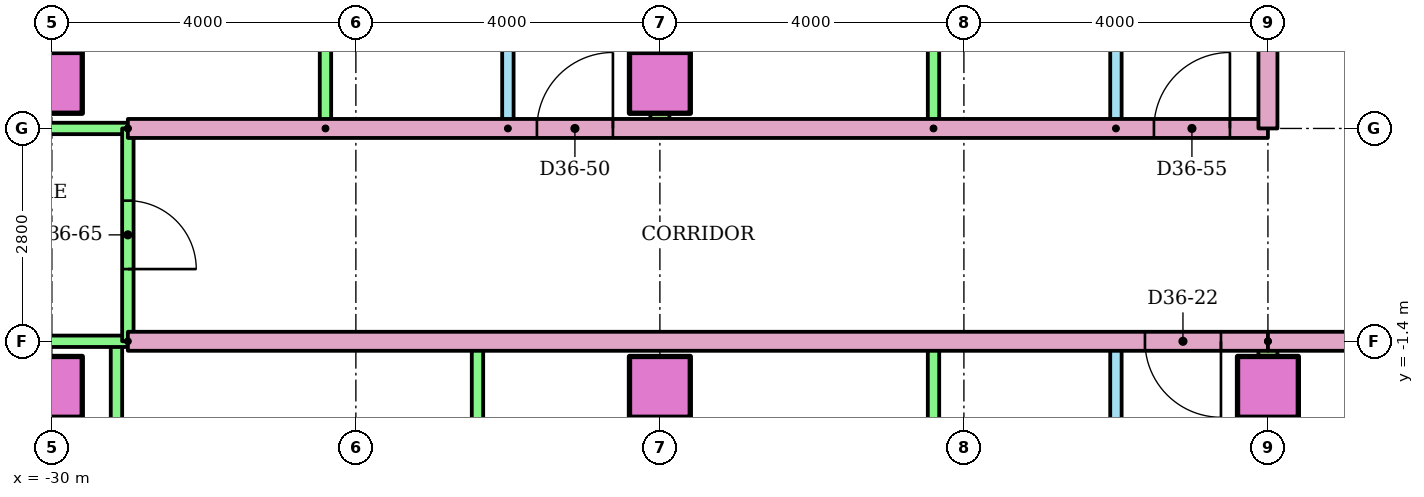
"""IFC4 building model, lengths in metres.
Left out: names, types, materials, properties, quantities, classifications, styles, units other than length and angle.
Written with IfcOpenShell. Run it as: python <this file> out.ifc"""

import sys

from ifc_helpers import new_model, si_unit, direction, frame, frame_2d, origin, origin_2d, place, context, subcontext, project, spatial, rectangle, extrude, element, fill, save


model = new_model("IFC4")
c1 = context("Model", 3, precision=1e-05, world=origin(), true_north=direction((0.0, 1.0)))
c2 = subcontext(c1, "Body", "Model", "MODEL_VIEW")
j1 = project(units=[si_unit("LENGTHUNIT", "METRE"), si_unit("PLANEANGLEUNIT", "RADIAN")], contexts=[c1])
p1 = place(None, origin())
s1 = spatial("IfcSite", under=j1, at=p1, CompositionType="ELEMENT")
p2 = place(p1, origin())
s2 = spatial("IfcBuilding", under=s1, at=p2, CompositionType="ELEMENT")
p3 = place(p2, frame((0.0, 0.0, 139.0)))
s3 = spatial("IfcBuildingStorey", under=s2, at=p3, CompositionType="ELEMENT", Elevation=139.0)
for number, where in (
    (1, (-30.0, -2.0, 0.0)),
    (2, (-22.0, -2.0, 0.0)),
    (3, (-14.0, -2.0, 0.0)),
    (4, (-30.0, 2.0, 0.0)),
    (5, (-22.0, 2.0, 0.0)),
):
    element("IfcColumn", number, at=place(p3, frame(where)), inside=s3, PredefinedType="COLUMN", context=c2, shape_type="SweptSolid", body=[
        extrude(rectangle(XDim=0.8, YDim=0.8, at=origin_2d()), origin(), (0.0, 0.0, 1.0), 3.2),
    ])
p4 = place(p3, frame((-16.0, -6.8, 0.0), z_axis=(0.0, 0.0, 1.0), x_axis=(0.0, 1.0, 0.0)))
e6 = element("IfcWall", 6, at=p4, inside=s3, PredefinedType="PARTITIONING", context=c2, shape_type="SweptSolid", body=[
    extrude(rectangle(XDim=5.4, YDim=0.15, at=frame_2d((2.7, 0.0))), origin(), (0.0, 0.0, 1.0), 2.4),
])
p5 = place(p4, frame((3.45, 0.0, 0.0)))
e7 = element("IfcOpeningElement", 7, at=p5, cuts=e6, PredefinedType="OPENING", context=c2, shape_type="SweptSolid", body=[
    extrude(rectangle(XDim=0.9, YDim=2.1, at=frame_2d((0.45, 1.05))), frame((0.0, 0.085, 0.0), z_axis=(0.0, -1.0, 0.0), x_axis=(1.0, 0.0, 0.0)), (0.0, 0.0, 1.0), 0.17),
])
p6 = place(p4, frame((0.8, 0.0, 0.0)))
e8 = element("IfcOpeningElement", 8, at=p6, cuts=e6, PredefinedType="OPENING", context=c2, shape_type="SweptSolid", body=[
    extrude(rectangle(XDim=0.8, YDim=2.1, at=frame_2d((0.4, 1.05))), frame((0.0, 0.085, 0.0), z_axis=(0.0, -1.0, 0.0), x_axis=(1.0, 0.0, 0.0)), (0.0, 0.0, 1.0), 0.17),
])
for number, where, z_axis, x_axis in (
    (9, (-18.4, -6.8, 0.0), (0.0, 0.0, 1.0), (0.0, 1.0, 0.0)),
    (10, (-24.4, -6.8, 0.0), (0.0, 0.0, 1.0), (0.0, 1.0, 0.0)),
    (11, (-29.15, -6.8, 0.0), (0.0, 0.0, 1.0), (0.0, 1.0, 0.0)),
):
    element("IfcWall", number, at=place(p3, frame(where, z_axis=z_axis, x_axis=x_axis)), inside=s3, PredefinedType="PARTITIONING", context=c2, shape_type="SweptSolid", body=[
        extrude(rectangle(XDim=5.4, YDim=0.15, at=frame_2d((2.7, 0.0))), origin(), (0.0, 0.0, 1.0), 2.4),
    ])
p7 = place(p3, frame((-14.0, -1.4, 0.0), z_axis=(0.0, 0.0, 1.0), x_axis=(0.0, -1.0, 0.0)))
e12 = element("IfcWall", 12, at=p7, inside=s3, PredefinedType="PARTITIONING", context=c2, shape_type="SweptSolid", body=[
    extrude(rectangle(XDim=14.91, YDim=0.25, at=frame_2d((7.455, 0.0))), origin(), (0.0, 0.0, 1.0), 2.4),
])
p8 = place(p3, frame((-14.0, -1.4, 0.0), z_axis=(0.0, 0.0, 1.0), x_axis=(-1.0, 0.0, 0.0)))
e13 = element("IfcWall", 13, at=p8, inside=s3, PredefinedType="PARTITIONING", context=c2, shape_type="SweptSolid", body=[
    extrude(rectangle(XDim=15.0, YDim=0.25, at=frame_2d((7.5, 0.0))), origin(), (0.0, 0.0, 1.0), 2.4),
])
p9 = place(p8, frame((0.618, 0.0, 0.0)))
e14 = element("IfcOpeningElement", 14, at=p9, cuts=e13, PredefinedType="OPENING", context=c2, shape_type="SweptSolid", body=[
    extrude(rectangle(XDim=1.0, YDim=2.1, at=frame_2d((0.5, 1.05))), frame((0.0, 0.135, 0.0), z_axis=(0.0, -1.0, 0.0), x_axis=(1.0, 0.0, 0.0)), (0.0, 0.0, 1.0), 0.27),
])
p10 = place(p3, frame((-29.0, -1.4, 0.0), z_axis=(0.0, 0.0, 1.0), x_axis=(-1.0, 0.0, 0.0)))
e15 = element("IfcWall", 15, at=p10, inside=s3, PredefinedType="PARTITIONING", context=c2, shape_type="SweptSolid", body=[
    extrude(rectangle(XDim=3.72, YDim=0.15, at=frame_2d((1.86, 0.0))), origin(), (0.0, 0.0, 1.0), 2.4),
])
p11 = place(p3, frame((-24.0, 1.4, 0.0), z_axis=(0.0, 0.0, 1.0), x_axis=(0.0, 1.0, 0.0)))
e16 = element("IfcWall", 16, at=p11, inside=s3, PredefinedType="PARTITIONING", context=c2, shape_type="SweptSolid", body=[
    extrude(rectangle(XDim=7.8, YDim=0.15, at=frame_2d((3.9, 0.0))), origin(), (0.0, 0.0, 1.0), 2.4),
])
p12 = place(p11, frame((1.675, 0.0, 0.0)))
e17 = element("IfcOpeningElement", 17, at=p12, cuts=e16, PredefinedType="OPENING", context=c2, shape_type="SweptSolid", body=[
    extrude(rectangle(XDim=0.9, YDim=2.1, at=frame_2d((0.45, 1.05))), frame((0.0, 0.085, 0.0), z_axis=(0.0, -1.0, 0.0), x_axis=(1.0, 0.0, 0.0)), (0.0, 0.0, 1.0), 0.17),
])
p13 = place(p11, frame((5.625, 0.0, 0.0)))
e18 = element("IfcOpeningElement", 18, at=p13, cuts=e16, PredefinedType="OPENING", context=c2, shape_type="SweptSolid", body=[
    extrude(rectangle(XDim=0.8, YDim=2.1, at=frame_2d((0.4, 1.05))), frame((0.0, 0.085, 0.0), z_axis=(0.0, -1.0, 0.0), x_axis=(1.0, 0.0, 0.0)), (0.0, 0.0, 1.0), 0.17),
])
p14 = place(p3, frame((-26.4, 1.4, 0.0), z_axis=(0.0, 0.0, 1.0), x_axis=(0.0, 1.0, 0.0)))
e19 = element("IfcWall", 19, at=p14, inside=s3, PredefinedType="PARTITIONING", context=c2, shape_type="SweptSolid", body=[
    extrude(rectangle(XDim=7.8, YDim=0.15, at=frame_2d((3.9, 0.0))), origin(), (0.0, 0.0, 1.0), 2.4),
])
p15 = place(p3, frame((-16.0, 1.4, 0.0), z_axis=(0.0, 0.0, 1.0), x_axis=(0.0, 1.0, 0.0)))
e20 = element("IfcWall", 20, at=p15, inside=s3, PredefinedType="PARTITIONING", context=c2, shape_type="SweptSolid", body=[
    extrude(rectangle(XDim=7.8, YDim=0.15, at=frame_2d((3.9, 0.0))), origin(), (0.0, 0.0, 1.0), 2.4),
])
p16 = place(p15, frame((1.675, 0.0, 0.0)))
e21 = element("IfcOpeningElement", 21, at=p16, cuts=e20, PredefinedType="OPENING", context=c2, shape_type="SweptSolid", body=[
    extrude(rectangle(XDim=0.9, YDim=2.1, at=frame_2d((0.45, 1.05))), frame((0.0, 0.085, 0.0), z_axis=(0.0, -1.0, 0.0), x_axis=(1.0, 0.0, 0.0)), (0.0, 0.0, 1.0), 0.17),
])
p17 = place(p15, frame((5.625, 0.0, 0.0)))
e22 = element("IfcOpeningElement", 22, at=p17, cuts=e20, PredefinedType="OPENING", context=c2, shape_type="SweptSolid", body=[
    extrude(rectangle(XDim=0.8, YDim=2.1, at=frame_2d((0.4, 1.05))), frame((0.0, 0.085, 0.0), z_axis=(0.0, -1.0, 0.0), x_axis=(1.0, 0.0, 0.0)), (0.0, 0.0, 1.0), 0.17),
])
p18 = place(p3, frame((-18.4, 1.4, 0.0), z_axis=(0.0, 0.0, 1.0), x_axis=(0.0, 1.0, 0.0)))
e23 = element("IfcWall", 23, at=p18, inside=s3, PredefinedType="PARTITIONING", context=c2, shape_type="SweptSolid", body=[
    extrude(rectangle(XDim=7.8, YDim=0.15, at=frame_2d((3.9, 0.0))), origin(), (0.0, 0.0, 1.0), 2.4),
])
p19 = place(p3, frame((-22.0, 18.721, 0.0), z_axis=(0.0, 0.0, 1.0), x_axis=(0.0, -1.0, 0.0)))
e24 = element("IfcWall", 24, at=p19, inside=s3, PredefinedType="PARTITIONING", context=c2, shape_type="SweptSolid", body=[
    extrude(rectangle(XDim=17.321, YDim=0.25, at=frame_2d((8.661, 0.0))), origin(), (0.0, 0.0, 1.0), 2.4),
])
p20 = place(p3, frame((-29.0, 1.4, 0.0)))
e25 = element("IfcWall", 25, at=p20, inside=s3, PredefinedType="PARTITIONING", context=c2, shape_type="SweptSolid", body=[
    extrude(rectangle(XDim=15.0, YDim=0.25, at=frame_2d((7.5, 0.0))), origin(), (0.0, 0.0, 1.0), 2.4),
])
p21 = place(p20, frame((5.382, 0.0, 0.0)))
e26 = element("IfcOpeningElement", 26, at=p21, cuts=e25, PredefinedType="OPENING", context=c2, shape_type="SweptSolid", body=[
    extrude(rectangle(XDim=1.0, YDim=2.1, at=frame_2d((0.5, 1.05))), frame((0.0, 0.135, 0.0), z_axis=(0.0, -1.0, 0.0), x_axis=(1.0, 0.0, 0.0)), (0.0, 0.0, 1.0), 0.27),
])
p22 = place(p20, frame((13.5, 0.0, 0.0)))
e27 = element("IfcOpeningElement", 27, at=p22, cuts=e25, PredefinedType="OPENING", context=c2, shape_type="SweptSolid", body=[
    extrude(rectangle(XDim=1.0, YDim=2.1, at=frame_2d((0.5, 1.05))), frame((0.0, 0.135, 0.0), z_axis=(0.0, -1.0, 0.0), x_axis=(1.0, 0.0, 0.0)), (0.0, 0.0, 1.0), 0.27),
])
p23 = place(p3, frame((-32.72, 1.4, 0.0)))
e28 = element("IfcWall", 28, at=p23, inside=s3, PredefinedType="PARTITIONING", context=c2, shape_type="SweptSolid", body=[
    extrude(rectangle(XDim=3.72, YDim=0.15, at=frame_2d((1.86, 0.0))), origin(), (0.0, 0.0, 1.0), 2.4),
])
p24 = place(p3, frame((-29.0, 1.4, 0.0), z_axis=(0.0, 0.0, 1.0), x_axis=(0.0, -1.0, 0.0)))
e29 = element("IfcWall", 29, at=p24, inside=s3, PredefinedType="PARTITIONING", context=c2, shape_type="SweptSolid", body=[
    extrude(rectangle(XDim=2.8, YDim=0.15, at=frame_2d((1.4, 0.0))), origin(), (0.0, 0.0, 1.0), 2.4),
])
p25 = place(p24, frame((0.95, 0.0, 0.0)))
e30 = element("IfcOpeningElement", 30, at=p25, cuts=e29, PredefinedType="OPENING", context=c2, shape_type="SweptSolid", body=[
    extrude(rectangle(XDim=0.9, YDim=2.1, at=frame_2d((0.45, 1.05))), frame((0.0, 0.085, 0.0), z_axis=(0.0, -1.0, 0.0), x_axis=(1.0, 0.0, 0.0)), (0.0, 0.0, 1.0), 0.17),
])
p26 = place(p3, frame((14.0, -1.4, 0.0), z_axis=(0.0, 0.0, 1.0), x_axis=(-1.0, 0.0, 0.0)))
e31 = element("IfcWall", 31, at=p26, inside=s3, PredefinedType="PARTITIONING", context=c2, shape_type="SweptSolid", body=[
    extrude(rectangle(XDim=28.0, YDim=0.25, at=frame_2d((14.0, 0.0))), origin(), (0.0, 0.0, 1.0), 2.4),
])
p27 = place(p26, frame((4.618, 0.0, 0.0)))
e32 = element("IfcOpeningElement", 32, at=p27, cuts=e31, PredefinedType="OPENING", context=c2, shape_type="SweptSolid", body=[
    extrude(rectangle(XDim=1.0, YDim=2.1, at=frame_2d((0.5, 1.05))), frame((0.0, 0.135, 0.0), z_axis=(0.0, -1.0, 0.0), x_axis=(1.0, 0.0, 0.0)), (0.0, 0.0, 1.0), 0.27),
])
p28 = place(p26, frame((2.382, 0.0, 0.0)))
e33 = element("IfcOpeningElement", 33, at=p28, cuts=e31, PredefinedType="OPENING", context=c2, shape_type="SweptSolid", body=[
    extrude(rectangle(XDim=1.0, YDim=2.1, at=frame_2d((0.5, 1.05))), frame((0.0, 0.135, 0.0), z_axis=(0.0, -1.0, 0.0), x_axis=(1.0, 0.0, 0.0)), (0.0, 0.0, 1.0), 0.27),
])
p29 = place(p3, frame((-14.0, 3.0, 0.0), z_axis=(0.0, 0.0, 1.0), x_axis=(0.0, -1.0, 0.0)))
e34 = element("IfcWall", 34, at=p29, inside=s3, PredefinedType="PARTITIONING", context=c2, shape_type="SweptSolid", body=[
    extrude(rectangle(XDim=1.6, YDim=0.25, at=frame_2d((0.8, 0.0))), origin(), (0.0, 0.0, 1.0), 2.4),
])
p30 = place(p9, origin())
e35 = element("IfcDoor", 35, at=p30, inside=s3, OperationType="SINGLE_SWING_LEFT", PredefinedType="DOOR", context=c2, shape_type="SweptSolid", body=[
    extrude(rectangle(XDim=1.0, YDim=2.1, at=frame_2d((0.5, 1.05))), frame((0.0, 0.025, 0.0), z_axis=(0.0, -1.0, 0.0), x_axis=(1.0, 0.0, 0.0)), (0.0, 0.0, 1.0), 0.05),
])
fill(e14, e35)
p31 = place(p21, origin())
e36 = element("IfcDoor", 36, at=p31, inside=s3, OperationType="SINGLE_SWING_RIGHT", PredefinedType="DOOR", context=c2, shape_type="SweptSolid", body=[
    extrude(rectangle(XDim=1.0, YDim=2.1, at=frame_2d((0.5, 1.05))), frame((0.0, 0.025, 0.0), z_axis=(0.0, -1.0, 0.0), x_axis=(1.0, 0.0, 0.0)), (0.0, 0.0, 1.0), 0.05),
])
fill(e26, e36)
p32 = place(p22, origin())
e37 = element("IfcDoor", 37, at=p32, inside=s3, OperationType="SINGLE_SWING_RIGHT", PredefinedType="DOOR", context=c2, shape_type="SweptSolid", body=[
    extrude(rectangle(XDim=1.0, YDim=2.1, at=frame_2d((0.5, 1.05))), frame((0.0, 0.025, 0.0), z_axis=(0.0, -1.0, 0.0), x_axis=(1.0, 0.0, 0.0)), (0.0, 0.0, 1.0), 0.05),
])
fill(e27, e37)
p33 = place(p25, origin())
e38 = element("IfcDoor", 38, at=p33, inside=s3, OperationType="SINGLE_SWING_RIGHT", PredefinedType="DOOR", context=c2, shape_type="SweptSolid", body=[
    extrude(rectangle(XDim=0.9, YDim=2.1, at=frame_2d((0.45, 1.05))), frame((0.0, 0.025, 0.0), z_axis=(0.0, -1.0, 0.0), x_axis=(1.0, 0.0, 0.0)), (0.0, 0.0, 1.0), 0.05),
])
fill(e30, e38)
save(model, sys.argv[1])
